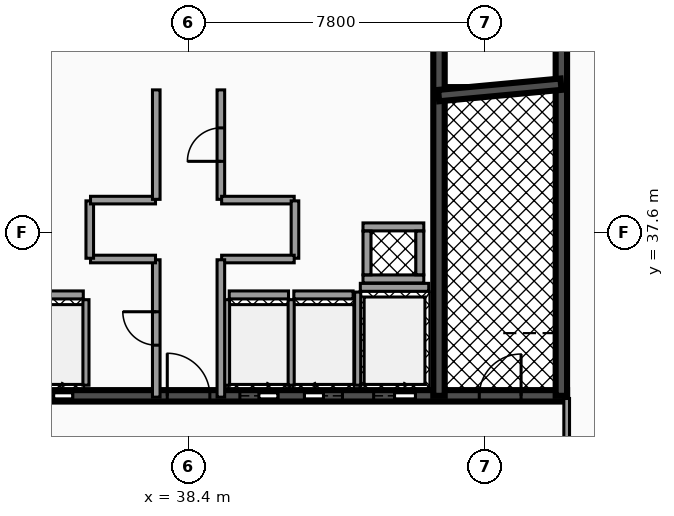
"""IFC4 building model, lengths in metres.
Left out: names, types, materials, properties, quantities, classifications, styles, units other than length and angle.
Written with IfcOpenShell. Run it as: python <this file> out.ifc"""

import sys

from ifc_helpers import new_model, si_unit, direction, frame, frame_2d, origin, origin_2d, place, context, subcontext, project, spatial, rectangle, extrude, element, fill, save


model = new_model("IFC4")
c1 = context("Model", 3, precision=1e-05, world=origin(), true_north=direction((0.0, 1.0)))
c2 = subcontext(c1, "Body", "Model", "MODEL_VIEW")
j1 = project(units=[si_unit("LENGTHUNIT", "METRE"), si_unit("PLANEANGLEUNIT", "RADIAN")], contexts=[c1])
p1 = place(None, origin())
s1 = spatial("IfcSite", under=j1, at=p1, CompositionType="ELEMENT")
p2 = place(p1, origin())
s2 = spatial("IfcBuilding", under=s1, at=p2, CompositionType="ELEMENT")
p3 = place(p2, frame((0.0, 0.0, 299.2)))
s3 = spatial("IfcBuildingStorey", under=s2, at=p3, CompositionType="ELEMENT", Elevation=299.2)
p4 = place(p3, frame((28.5, 33.3, 0.0), z_axis=(0.0, 0.0, 1.0), x_axis=(1.0, 0.0, 0.0)))
e1 = element("IfcWall", 1, at=p4, inside=s3, PredefinedType="SHEAR", context=c2, shape_type="SweptSolid", body=[
    extrude(rectangle(XDim=19.86, YDim=0.3, at=frame_2d((9.93, 0.0))), origin(), (0.0, 0.0, 1.0), 3.78),
])
p5 = place(p4, frame((3.93, 0.0, 0.0)))
e2 = element("IfcOpeningElement", 2, at=p5, cuts=e1, PredefinedType="OPENING", context=c2, shape_type="SweptSolid", body=[
    extrude(rectangle(XDim=1.1, YDim=2.15, at=frame_2d((0.55, 1.075))), frame((0.0, 0.16, 0.0), z_axis=(0.0, -1.0, 0.0), x_axis=(1.0, 0.0, 0.0)), (0.0, 0.0, 1.0), 0.32),
])
p6 = place(p4, frame((14.77, 0.0, 0.0)))
e3 = element("IfcOpeningElement", 3, at=p6, cuts=e1, PredefinedType="OPENING", context=c2, shape_type="SweptSolid", body=[
    extrude(rectangle(XDim=1.1, YDim=2.15, at=frame_2d((0.55, 1.075))), frame((0.0, 0.16, 0.0), z_axis=(0.0, -1.0, 0.0), x_axis=(1.0, 0.0, 0.0)), (0.0, 0.0, 1.0), 0.32),
])
p7 = place(p4, frame((11.25, 0.0, 0.0)))
e4 = element("IfcOpeningElement", 4, at=p7, cuts=e1, PredefinedType="OPENING", context=c2, shape_type="SweptSolid", body=[
    extrude(rectangle(XDim=1.0, YDim=2.1, at=frame_2d((0.5, 1.05))), frame((0.0, 0.16, 0.0), z_axis=(0.0, -1.0, 0.0), x_axis=(1.0, 0.0, 0.0)), (0.0, 0.0, 1.0), 0.32),
])
p8 = place(p4, frame((12.95, 0.0, 0.0)))
e5 = element("IfcOpeningElement", 5, at=p8, cuts=e1, PredefinedType="OPENING", context=c2, shape_type="SweptSolid", body=[
    extrude(rectangle(XDim=1.0, YDim=2.1, at=frame_2d((0.5, 1.05))), frame((0.0, 0.16, 0.0), z_axis=(0.0, -1.0, 0.0), x_axis=(1.0, 0.0, 0.0)), (0.0, 0.0, 1.0), 0.32),
])
p9 = place(p4, frame((5.85, 0.0, 0.0)))
e6 = element("IfcOpeningElement", 6, at=p9, cuts=e1, PredefinedType="OPENING", context=c2, shape_type="SweptSolid", body=[
    extrude(rectangle(XDim=1.0, YDim=2.1, at=frame_2d((0.5, 1.05))), frame((0.0, 0.16, 0.0), z_axis=(0.0, -1.0, 0.0), x_axis=(1.0, 0.0, 0.0)), (0.0, 0.0, 1.0), 0.32),
])
p10 = place(p4, frame((1.21, 0.0, 0.0)))
e7 = element("IfcOpeningElement", 7, at=p10, cuts=e1, PredefinedType="OPENING", context=c2, shape_type="SweptSolid", body=[
    extrude(rectangle(XDim=1.1, YDim=2.2, at=frame_2d((0.55, 1.1))), frame((0.0, 0.16, 0.0), z_axis=(0.0, -1.0, 0.0), x_axis=(1.0, 0.0, 0.0)), (0.0, 0.0, 1.0), 0.32),
])
p11 = place(p4, frame((9.34, 0.0, 0.0)))
e8 = element("IfcOpeningElement", 8, at=p11, cuts=e1, PredefinedType="OPENING", context=c2, shape_type="SweptSolid", body=[
    extrude(rectangle(XDim=1.12, YDim=2.05, at=frame_2d((0.56, 1.025))), frame((0.0, 0.16, 0.0), z_axis=(0.0, -1.0, 0.0), x_axis=(1.0, 0.0, 0.0)), (0.0, 0.0, 1.0), 0.32),
])
p12 = place(p4, frame((17.55, 0.0, 0.0)))
e9 = element("IfcOpeningElement", 9, at=p12, cuts=e1, PredefinedType="OPENING", context=c2, shape_type="SweptSolid", body=[
    extrude(rectangle(XDim=1.1, YDim=2.2, at=frame_2d((0.55, 1.1))), frame((0.0, 0.16, 0.0), z_axis=(0.0, -1.0, 0.0), x_axis=(1.0, 0.0, 0.0)), (0.0, 0.0, 1.0), 0.32),
])
for number, where, z_axis, x_axis in (
    (10, (44.99, 33.3, 0.0), (0.0, 0.0, 1.0), (0.0, 1.0, 0.0)),
    (11, (48.21, 33.3, 0.0), (0.0, 0.0, 1.0), (0.0, 1.0, 0.0)),
):
    element("IfcWall", number, at=place(p3, frame(where, z_axis=z_axis, x_axis=x_axis)), inside=s3, PredefinedType="SHEAR", context=c2, shape_type="SweptSolid", body=[
        extrude(rectangle(XDim=10.1, YDim=0.3, at=frame_2d((5.05, 0.0))), origin(), (0.0, 0.0, 1.0), 3.78),
    ])
p13 = place(p3, frame((44.98, 41.2, 0.0), z_axis=(0.0, 0.0, 1.0), x_axis=(0.995686468965, 0.09278176286, 0.0)))
e12 = element("IfcWall", 12, at=p13, inside=s3, PredefinedType="SHEAR", context=c2, shape_type="SweptSolid", body=[
    extrude(rectangle(XDim=3.234, YDim=0.3, at=frame_2d((1.617, 0.0))), origin(), (0.0, 0.0, 1.0), 3.78),
])
p14 = place(p3, frame((42.92, 36.155, 0.0), z_axis=(0.0, 0.0, 1.0), x_axis=(1.0, 0.0, 0.0)))
e13 = element("IfcWall", 13, at=p14, inside=s3, PredefinedType="SOLIDWALL", context=c2, shape_type="SweptSolid", body=[
    extrude(rectangle(XDim=1.8, YDim=0.21, at=frame_2d((0.9, 0.0))), origin(), (0.0, 0.0, 1.0), 2.85),
])
p15 = place(p3, frame((42.85, 33.58, 0.0), z_axis=(0.0, 0.0, 1.0), x_axis=(0.0, 1.0, 0.0)))
e14 = element("IfcWall", 14, at=p15, inside=s3, PredefinedType="SOLIDWALL", context=c2, shape_type="SweptSolid", body=[
    extrude(rectangle(XDim=2.45, YDim=0.16, at=frame_2d((1.225, 0.0))), origin(), (0.0, 0.0, 1.0), 2.85),
])
p16 = place(p3, frame((39.47, 35.955, 0.0), z_axis=(0.0, 0.0, 1.0), x_axis=(1.0, 0.0, 0.0)))
e15 = element("IfcWall", 15, at=p16, inside=s3, PredefinedType="SOLIDWALL", context=c2, shape_type="SweptSolid", body=[
    extrude(rectangle(XDim=1.56, YDim=0.21, at=frame_2d((0.78, 0.0))), origin(), (0.0, 0.0, 1.0), 2.85),
])
for number, where, z_axis, x_axis in (
    (16, (39.4, 33.58, 0.0), (0.0, 0.0, 1.0), (0.0, 1.0, 0.0)),
    (17, (41.1, 33.58, 0.0), (0.0, 0.0, 1.0), (0.0, 1.0, 0.0)),
):
    element("IfcWall", number, at=place(p3, frame(where, z_axis=z_axis, x_axis=x_axis)), inside=s3, PredefinedType="SOLIDWALL", context=c2, shape_type="SweptSolid", body=[
        extrude(rectangle(XDim=2.25, YDim=0.16, at=frame_2d((1.125, 0.0))), origin(), (0.0, 0.0, 1.0), 2.85),
    ])
p17 = place(p3, frame((41.17, 35.955, 0.0), z_axis=(0.0, 0.0, 1.0), x_axis=(1.0, 0.0, 0.0)))
e18 = element("IfcWall", 18, at=p17, inside=s3, PredefinedType="SOLIDWALL", context=c2, shape_type="SweptSolid", body=[
    extrude(rectangle(XDim=1.56, YDim=0.21, at=frame_2d((0.78, 0.0))), origin(), (0.0, 0.0, 1.0), 2.85),
])
p18 = place(p3, frame((34.07, 35.955, 0.0), z_axis=(0.0, 0.0, 1.0), x_axis=(1.0, 0.0, 0.0)))
e19 = element("IfcWall", 19, at=p18, inside=s3, PredefinedType="SOLIDWALL", context=c2, shape_type="SweptSolid", body=[
    extrude(rectangle(XDim=1.56, YDim=0.21, at=frame_2d((0.78, 0.0))), origin(), (0.0, 0.0, 1.0), 2.85),
])
p19 = place(p3, frame((35.7, 33.58, 0.0), z_axis=(0.0, 0.0, 1.0), x_axis=(0.0, 1.0, 0.0)))
e20 = element("IfcWall", 20, at=p19, inside=s3, PredefinedType="SOLIDWALL", context=c2, shape_type="SweptSolid", body=[
    extrude(rectangle(XDim=2.25, YDim=0.16, at=frame_2d((1.125, 0.0))), origin(), (0.0, 0.0, 1.0), 2.85),
])
for number, where, z_axis, x_axis in (
    (21, (42.99, 36.375, 0.0), (0.0, 0.0, 1.0), (1.0, 0.0, 0.0)),
    (22, (42.99, 37.745, 0.0), (0.0, 0.0, 1.0), (1.0, 0.0, 0.0)),
):
    element("IfcWall", number, at=place(p3, frame(where, z_axis=z_axis, x_axis=x_axis)), inside=s3, PredefinedType="SOLIDWALL", context=c2, shape_type="SweptSolid", body=[
        extrude(rectangle(XDim=1.6, YDim=0.21, at=frame_2d((0.8, 0.0))), origin(), (0.0, 0.0, 1.0), 3.78),
    ])
for number, where, z_axis, x_axis in (
    (23, (43.095, 36.485, 0.0), (0.0, 0.0, 1.0), (0.0, 1.0, 0.0)),
    (24, (44.485, 36.485, 0.0), (0.0, 0.0, 1.0), (0.0, 1.0, 0.0)),
):
    element("IfcWall", number, at=place(p3, frame(where, z_axis=z_axis, x_axis=x_axis)), inside=s3, PredefinedType="SOLIDWALL", context=c2, shape_type="SweptSolid", body=[
        extrude(rectangle(XDim=1.15, YDim=0.21, at=frame_2d((0.575, 0.0))), origin(), (0.0, 0.0, 1.0), 3.78),
    ])
p20 = place(p3, frame((37.55, 33.265, 0.0), z_axis=(0.0, 0.0, 1.0), x_axis=(0.0, 1.0, 0.0)))
e25 = element("IfcWall", 25, at=p20, inside=s3, PredefinedType="PARTITIONING", context=c2, shape_type="SweptSolid", body=[
    extrude(rectangle(XDim=3.615, YDim=0.2, at=frame_2d((1.808, 0.0))), origin(), (0.0, 0.0, 1.0), 2.835),
])
p21 = place(p20, frame((1.367, 0.0, 0.0)))
e26 = element("IfcOpeningElement", 26, at=p21, cuts=e25, PredefinedType="OPENING", context=c2, shape_type="SweptSolid", body=[
    extrude(rectangle(XDim=0.88, YDim=2.05, at=frame_2d((0.44, 1.025))), frame((0.0, 0.11, 0.0), z_axis=(0.0, -1.0, 0.0), x_axis=(1.0, 0.0, 0.0)), (0.0, 0.0, 1.0), 0.22),
])
p22 = place(p3, frame((35.82, 36.9, 0.0), z_axis=(0.0, 0.0, 1.0), x_axis=(1.0, 0.0, 0.0)))
e27 = element("IfcWall", 27, at=p22, inside=s3, PredefinedType="PARTITIONING", context=c2, shape_type="SweptSolid", body=[
    extrude(rectangle(XDim=1.71, YDim=0.2, at=frame_2d((0.855, 0.0))), origin(), (0.0, 0.0, 1.0), 2.835),
])
p23 = place(p3, frame((35.8, 36.92, 0.0), z_axis=(0.0, 0.0, 1.0), x_axis=(0.0, 1.0, 0.0)))
e28 = element("IfcWall", 28, at=p23, inside=s3, PredefinedType="PARTITIONING", context=c2, shape_type="SweptSolid", body=[
    extrude(rectangle(XDim=1.51, YDim=0.2, at=frame_2d((0.755, 0.0))), origin(), (0.0, 0.0, 1.0), 2.835),
])
p24 = place(p3, frame((35.82, 38.45, 0.0), z_axis=(0.0, 0.0, 1.0), x_axis=(1.0, 0.0, 0.0)))
e29 = element("IfcWall", 29, at=p24, inside=s3, PredefinedType="PARTITIONING", context=c2, shape_type="SweptSolid", body=[
    extrude(rectangle(XDim=1.71, YDim=0.2, at=frame_2d((0.855, 0.0))), origin(), (0.0, 0.0, 1.0), 2.835),
])
p25 = place(p3, frame((37.55, 38.47, 0.0), z_axis=(0.0, 0.0, 1.0), x_axis=(0.0, 1.0, 0.0)))
e30 = element("IfcWall", 30, at=p25, inside=s3, PredefinedType="PARTITIONING", context=c2, shape_type="SweptSolid", body=[
    extrude(rectangle(XDim=2.88, YDim=0.2, at=frame_2d((1.44, 0.0))), origin(), (0.0, 0.0, 1.0), 2.835),
])
p26 = place(p3, frame((39.25, 38.47, 0.0), z_axis=(0.0, 0.0, 1.0), x_axis=(0.0, 1.0, 0.0)))
e31 = element("IfcWall", 31, at=p26, inside=s3, PredefinedType="PARTITIONING", context=c2, shape_type="SweptSolid", body=[
    extrude(rectangle(XDim=2.88, YDim=0.2, at=frame_2d((1.44, 0.0))), origin(), (0.0, 0.0, 1.0), 2.835),
])
p27 = place(p26, frame((1.0, 0.0, 0.0)))
e32 = element("IfcOpeningElement", 32, at=p27, cuts=e31, PredefinedType="OPENING", context=c2, shape_type="SweptSolid", body=[
    extrude(rectangle(XDim=0.88, YDim=2.05, at=frame_2d((0.44, 1.025))), frame((0.0, 0.11, 0.0), z_axis=(0.0, -1.0, 0.0), x_axis=(1.0, 0.0, 0.0)), (0.0, 0.0, 1.0), 0.22),
])
p28 = place(p3, frame((39.27, 38.45, 0.0), z_axis=(0.0, 0.0, 1.0), x_axis=(1.0, 0.0, 0.0)))
e33 = element("IfcWall", 33, at=p28, inside=s3, PredefinedType="PARTITIONING", context=c2, shape_type="SweptSolid", body=[
    extrude(rectangle(XDim=1.91, YDim=0.2, at=frame_2d((0.955, 0.0))), origin(), (0.0, 0.0, 1.0), 2.835),
])
p29 = place(p3, frame((41.2, 36.92, 0.0), z_axis=(0.0, 0.0, 1.0), x_axis=(0.0, 1.0, 0.0)))
e34 = element("IfcWall", 34, at=p29, inside=s3, PredefinedType="PARTITIONING", context=c2, shape_type="SweptSolid", body=[
    extrude(rectangle(XDim=1.51, YDim=0.2, at=frame_2d((0.755, 0.0))), origin(), (0.0, 0.0, 1.0), 2.835),
])
p30 = place(p3, frame((39.27, 36.9, 0.0), z_axis=(0.0, 0.0, 1.0), x_axis=(1.0, 0.0, 0.0)))
e35 = element("IfcWall", 35, at=p30, inside=s3, PredefinedType="PARTITIONING", context=c2, shape_type="SweptSolid", body=[
    extrude(rectangle(XDim=1.91, YDim=0.2, at=frame_2d((0.955, 0.0))), origin(), (0.0, 0.0, 1.0), 2.835),
])
p31 = place(p3, frame((39.25, 33.265, 0.0), z_axis=(0.0, 0.0, 1.0), x_axis=(0.0, 1.0, 0.0)))
e36 = element("IfcWall", 36, at=p31, inside=s3, PredefinedType="PARTITIONING", context=c2, shape_type="SweptSolid", body=[
    extrude(rectangle(XDim=3.615, YDim=0.2, at=frame_2d((1.808, 0.0))), origin(), (0.0, 0.0, 1.0), 2.835),
])
p32 = place(p3, frame((48.35, 30.17, 0.0), z_axis=(0.0, 0.0, 1.0), x_axis=(0.0, 1.0, 0.0)))
e37 = element("IfcWall", 37, at=p32, inside=s3, PredefinedType="PARTITIONING", context=c2, shape_type="SweptSolid", body=[
    extrude(rectangle(XDim=3.06, YDim=0.15, at=frame_2d((1.53, 0.0))), origin(), (0.0, 0.0, 1.0), 2.835),
])
p33 = place(p32, frame((0.66, 0.0, 0.0)))
e38 = element("IfcOpeningElement", 38, at=p33, cuts=e37, PredefinedType="OPENING", context=c2, shape_type="SweptSolid", body=[
    extrude(rectangle(XDim=0.94, YDim=2.05, at=frame_2d((0.47, 1.025))), frame((0.0, 0.085, 0.0), z_axis=(0.0, -1.0, 0.0), x_axis=(1.0, 0.0, 0.0)), (0.0, 0.0, 1.0), 0.17),
])
p34 = place(p2, frame((0.0, 0.0, 303.28)))
p35 = place(p34, frame((0.0, 0.0, -0.3)))
p36 = place(p35, frame((35.2, 43.4, 0.0)))
p37 = place(p36, frame((0.0, 0.0, 0.25)))
e39 = element("IfcWindow", 39, at=p37, inside=s3, PartitioningType="SINGLE_PANEL", PredefinedType="SKYLIGHT", context=c2, shape_type="SweptSolid", body=[
    extrude(rectangle(XDim=1.8, YDim=2.2, at=origin_2d()), origin(), (0.0, 0.0, 1.0), 0.05),
])
p38 = place(p35, frame((38.4, 43.4, 0.0)))
p39 = place(p38, frame((0.0, 0.0, 0.25)))
e40 = element("IfcWindow", 40, at=p39, inside=s3, PartitioningType="SINGLE_PANEL", PredefinedType="SKYLIGHT", context=c2, shape_type="SweptSolid", body=[
    extrude(rectangle(XDim=1.8, YDim=2.2, at=origin_2d()), origin(), (0.0, 0.0, 1.0), 0.05),
])
p40 = place(p35, frame((41.6, 43.4, 0.0)))
p41 = place(p40, frame((0.0, 0.0, 0.25)))
e41 = element("IfcWindow", 41, at=p41, inside=s3, PartitioningType="SINGLE_PANEL", PredefinedType="SKYLIGHT", context=c2, shape_type="SweptSolid", body=[
    extrude(rectangle(XDim=1.8, YDim=2.2, at=origin_2d()), origin(), (0.0, 0.0, 1.0), 0.05),
])
p42 = place(p35, frame((38.4, 36.8, 0.0)))
p43 = place(p42, frame((0.0, 0.0, 0.25)))
e42 = element("IfcWindow", 42, at=p43, inside=s3, PartitioningType="SINGLE_PANEL", PredefinedType="SKYLIGHT", context=c2, shape_type="SweptSolid", body=[
    extrude(rectangle(XDim=0.9, YDim=1.2, at=origin_2d()), origin(), (0.0, 0.0, 1.0), 0.05),
])
p44 = place(p6, origin())
e43 = element("IfcDoor", 43, at=p44, inside=s3, OperationType="SLIDING_TO_RIGHT", PredefinedType="DOOR", context=c2, shape_type="SweptSolid", body=[
    extrude(rectangle(XDim=1.1, YDim=2.15, at=frame_2d((0.55, 1.075))), frame((0.0, 0.025, 0.0), z_axis=(0.0, -1.0, 0.0), x_axis=(1.0, 0.0, 0.0)), (0.0, 0.0, 1.0), 0.05),
])
fill(e3, e43)
p45 = place(p7, origin())
e44 = element("IfcDoor", 44, at=p45, inside=s3, OperationType="SLIDING_TO_RIGHT", PredefinedType="DOOR", context=c2, shape_type="SweptSolid", body=[
    extrude(rectangle(XDim=1.0, YDim=2.1, at=frame_2d((0.5, 1.05))), frame((0.0, 0.025, 0.0), z_axis=(0.0, -1.0, 0.0), x_axis=(1.0, 0.0, 0.0)), (0.0, 0.0, 1.0), 0.05),
])
fill(e4, e44)
p46 = place(p8, origin())
e45 = element("IfcDoor", 45, at=p46, inside=s3, OperationType="SLIDING_TO_LEFT", PredefinedType="DOOR", context=c2, shape_type="SweptSolid", body=[
    extrude(rectangle(XDim=1.0, YDim=2.1, at=frame_2d((0.5, 1.05))), frame((0.0, 0.025, 0.0), z_axis=(0.0, -1.0, 0.0), x_axis=(1.0, 0.0, 0.0)), (0.0, 0.0, 1.0), 0.05),
])
fill(e5, e45)
p47 = place(p9, origin())
e46 = element("IfcDoor", 46, at=p47, inside=s3, OperationType="SLIDING_TO_RIGHT", PredefinedType="DOOR", context=c2, shape_type="SweptSolid", body=[
    extrude(rectangle(XDim=1.0, YDim=2.1, at=frame_2d((0.5, 1.05))), frame((0.0, 0.025, 0.0), z_axis=(0.0, -1.0, 0.0), x_axis=(1.0, 0.0, 0.0)), (0.0, 0.0, 1.0), 0.05),
])
fill(e6, e46)
p48 = place(p11, origin())
e47 = element("IfcDoor", 47, at=p48, inside=s3, OperationType="SINGLE_SWING_LEFT", PredefinedType="DOOR", context=c2, shape_type="SweptSolid", body=[
    extrude(rectangle(XDim=1.12, YDim=2.05, at=frame_2d((0.56, 1.025))), frame((0.0, 0.025, 0.0), z_axis=(0.0, -1.0, 0.0), x_axis=(1.0, 0.0, 0.0)), (0.0, 0.0, 1.0), 0.05),
])
fill(e8, e47)
p49 = place(p12, origin())
e48 = element("IfcDoor", 48, at=p49, inside=s3, OperationType="SINGLE_SWING_RIGHT", PredefinedType="DOOR", context=c2, shape_type="SweptSolid", body=[
    extrude(rectangle(XDim=1.1, YDim=2.2, at=frame_2d((0.55, 1.1))), frame((0.0, 0.025, 0.0), z_axis=(0.0, -1.0, 0.0), x_axis=(1.0, 0.0, 0.0)), (0.0, 0.0, 1.0), 0.05),
])
fill(e9, e48)
p50 = place(p21, origin())
e49 = element("IfcDoor", 49, at=p50, inside=s3, OperationType="SINGLE_SWING_RIGHT", PredefinedType="DOOR", context=c2, shape_type="SweptSolid", body=[
    extrude(rectangle(XDim=0.88, YDim=2.05, at=frame_2d((0.44, 1.025))), frame((0.0, 0.025, 0.0), z_axis=(0.0, -1.0, 0.0), x_axis=(1.0, 0.0, 0.0)), (0.0, 0.0, 1.0), 0.05),
])
fill(e26, e49)
p51 = place(p27, origin())
e50 = element("IfcDoor", 50, at=p51, inside=s3, OperationType="SINGLE_SWING_LEFT", PredefinedType="DOOR", context=c2, shape_type="SweptSolid", body=[
    extrude(rectangle(XDim=0.88, YDim=2.05, at=frame_2d((0.44, 1.025))), frame((0.0, 0.025, 0.0), z_axis=(0.0, -1.0, 0.0), x_axis=(1.0, 0.0, 0.0)), (0.0, 0.0, 1.0), 0.05),
])
fill(e32, e50)
save(model, sys.argv[1])
